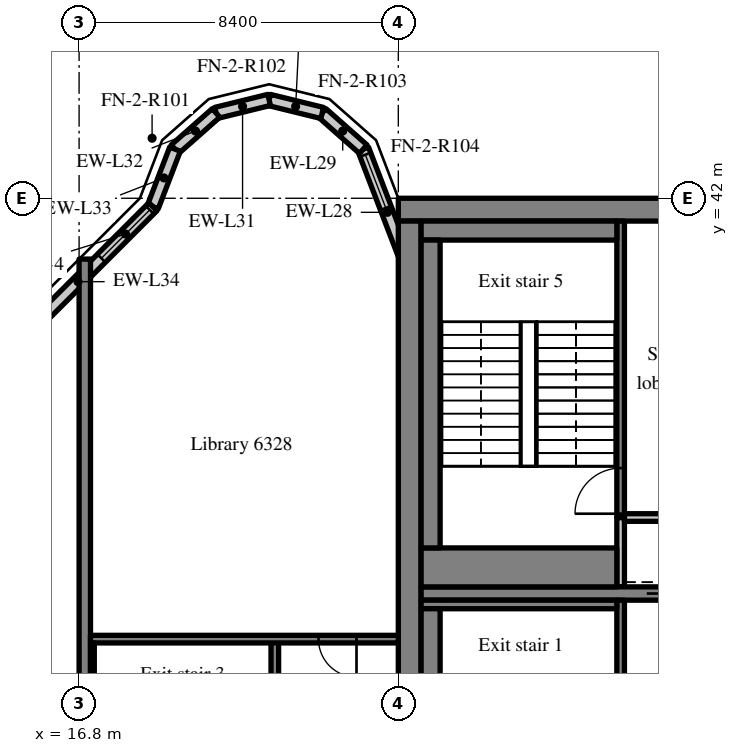
"""IFC4 building model, lengths in metres.
Left out: names, types, materials, properties, quantities, classifications, styles, units other than length and angle.
Written with IfcOpenShell. Run it as: python <this file> out.ifc"""

import sys

from ifc_helpers import new_model, si_unit, direction, frame, frame_2d, origin, place, context, subcontext, project, spatial, rectangle, extrude, source, transform, mapped, element, fill, save


model = new_model("IFC4")
c1 = context("Model", 3, precision=1e-05, world=origin(), true_north=direction((0.0, 1.0)))
c2 = subcontext(c1, "Body", "Model", "MODEL_VIEW")
j1 = project(units=[si_unit("LENGTHUNIT", "METRE"), si_unit("PLANEANGLEUNIT", "RADIAN")], contexts=[c1])
p1 = place(None, origin())
s1 = spatial("IfcSite", under=j1, at=p1, CompositionType="ELEMENT")
p2 = place(p1, origin())
s2 = spatial("IfcBuilding", under=s1, at=p2, CompositionType="ELEMENT")
p3 = place(p2, frame((0.0, 0.0, 260.8)))
s3 = spatial("IfcBuildingStorey", under=s2, at=p3, CompositionType="ELEMENT", Elevation=260.8)
m1 = source(origin(), c2, "Body", "SweptSolid", [
    extrude(rectangle(XDim=50.4, YDim=0.6, at=frame_2d((25.2, 0.0))), origin(), (0.0, 0.0, 1.0), 3.62),
])
p4 = place(p3, frame((25.2, 41.7, 0.0), z_axis=(0.0, 0.0, 1.0), x_axis=(1.0, 0.0, 0.0)))
e1 = element("IfcWall", 1, at=p4, inside=s3, PredefinedType="SHEAR", context=c2, shape_type="MappedRepresentation", body=[
    mapped(m1, transform((0.0, 0.0, 0.0), scale=1.0)),
])
m2 = source(origin(), c2, "Body", "SweptSolid", [
    extrude(rectangle(XDim=18.8, YDim=0.6, at=frame_2d((9.4, 0.0))), origin(), (0.0, 0.0, 1.0), 3.62),
])
p5 = place(p3, frame((25.5, 22.6, 0.0), z_axis=(0.0, 0.0, 1.0), x_axis=(0.0, 1.0, 0.0)))
e2 = element("IfcWall", 2, at=p5, inside=s3, PredefinedType="SHEAR", context=c2, shape_type="MappedRepresentation", body=[
    mapped(m2, transform((0.0, 0.0, 0.0), scale=1.0)),
])
m3 = source(origin(), c2, "Body", "SweptSolid", [
    extrude(rectangle(XDim=7.625, YDim=0.35, at=frame_2d((3.812, 0.0))), origin(), (0.0, 0.0, 1.0), 3.62),
])
p6 = place(p3, frame((25.8, 31.6, 0.0), z_axis=(0.0, 0.0, 1.0), x_axis=(1.0, 0.0, 0.0)))
e3 = element("IfcWall", 3, at=p6, inside=s3, PredefinedType="SHEAR", context=c2, shape_type="MappedRepresentation", body=[
    mapped(m3, transform((0.0, 0.0, 0.0), scale=1.0)),
])
m4 = source(origin(), c2, "Body", "SweptSolid", [
    extrude(rectangle(XDim=1.1, YDim=2.1, at=frame_2d((0.55, 1.05))), frame((0.0, 0.185, 0.0), z_axis=(0.0, -1.0, 0.0), x_axis=(1.0, 0.0, 0.0)), (0.0, 0.0, 1.0), 0.37),
])
p7 = place(p6, frame((5.938, 0.0, 0.0)))
e4 = element("IfcOpeningElement", 4, at=p7, cuts=e3, PredefinedType="OPENING", context=c2, shape_type="MappedRepresentation", body=[
    mapped(m4, transform((0.0, 0.0, 0.0), scale=1.0)),
])
m5 = source(origin(), c2, "Body", "SweptSolid", [
    extrude(rectangle(XDim=18.4, YDim=0.3, at=frame_2d((9.2, 0.0))), origin(), (0.0, 0.0, 1.0), 3.62),
])
p8 = place(p3, frame((16.95, 22.0, 0.0), z_axis=(0.0, 0.0, 1.0), x_axis=(0.0, 1.0, 0.0)))
e5 = element("IfcWall", 5, at=p8, inside=s3, PredefinedType="SHEAR", context=c2, shape_type="MappedRepresentation", body=[
    mapped(m5, transform((0.0, 0.0, 0.0), scale=1.0)),
])
m6 = source(origin(), c2, "Body", "SweptSolid", [
    extrude(rectangle(XDim=3.559, YDim=0.3, at=frame_2d((1.78, 0.0))), origin(), (0.0, 0.0, 1.0), 3.62),
])
p9 = place(p3, frame((25.55, 39.969, 0.0), z_axis=(0.0, 0.0, 1.0), x_axis=(-0.35779745313, 0.933799219604, 0.0)))
e6 = element("IfcWall", 6, at=p9, inside=s3, PredefinedType="SOLIDWALL", context=c2, shape_type="MappedRepresentation", body=[
    mapped(m6, transform((0.0, 0.0, 0.0), scale=1.0)),
])
m7 = source(origin(), c2, "Body", "SweptSolid", [
    extrude(rectangle(XDim=1.5, YDim=2.0, at=frame_2d((0.75, 1.0))), frame((0.0, 0.16, 0.0), z_axis=(0.0, -1.0, 0.0), x_axis=(1.0, 0.0, 0.0)), (0.0, 0.0, 1.0), 0.32),
])
p10 = place(p9, frame((1.903, 0.0, 0.9)))
e7 = element("IfcOpeningElement", 7, at=p10, cuts=e6, PredefinedType="OPENING", context=c2, shape_type="MappedRepresentation", body=[
    mapped(m7, transform((0.0, 0.0, 0.0), scale=1.0)),
])
m8 = source(origin(), c2, "Body", "SweptSolid", [
    extrude(rectangle(XDim=1.44, YDim=0.3, at=frame_2d((0.72, 0.0))), origin(), (0.0, 0.0, 1.0), 3.62),
])
p11 = place(p3, frame((24.277, 43.292, 0.0), z_axis=(0.0, 0.0, 1.0), x_axis=(-0.749649827867, 0.661834673902, 0.0)))
e8 = element("IfcWall", 8, at=p11, inside=s3, PredefinedType="SOLIDWALL", context=c2, shape_type="MappedRepresentation", body=[
    mapped(m8, transform((0.0, 0.0, 0.0), scale=1.0)),
])
m9 = source(origin(), c2, "Body", "SweptSolid", [
    extrude(rectangle(XDim=1.438, YDim=0.3, at=frame_2d((0.719, 0.0))), origin(), (0.0, 0.0, 1.0), 3.62),
])
p12 = place(p3, frame((23.197, 44.245, 0.0), z_axis=(0.0, 0.0, 1.0), x_axis=(-0.971152283879, 0.238460146601, 0.0)))
e9 = element("IfcWall", 9, at=p12, inside=s3, PredefinedType="SOLIDWALL", context=c2, shape_type="MappedRepresentation", body=[
    mapped(m9, transform((0.0, 0.0, 0.0), scale=1.0)),
])
m10 = source(origin(), c2, "Body", "SweptSolid", [
    extrude(rectangle(XDim=1.439, YDim=0.3, at=frame_2d((0.719, 0.0))), origin(), (0.0, 0.0, 1.0), 3.62),
])
p13 = place(p3, frame((21.8, 44.588, 0.0), z_axis=(0.0, 0.0, 1.0), x_axis=(-0.971161932466, -0.238420848351, 0.0)))
e10 = element("IfcWall", 10, at=p13, inside=s3, PredefinedType="SOLIDWALL", context=c2, shape_type="MappedRepresentation", body=[
    mapped(m10, transform((0.0, 0.0, 0.0), scale=1.0)),
])
m11 = source(origin(), c2, "Body", "SweptSolid", [
    extrude(rectangle(XDim=1.44, YDim=0.3, at=frame_2d((0.72, 0.0))), origin(), (0.0, 0.0, 1.0), 3.62),
])
p14 = place(p3, frame((20.403, 44.245, 0.0), z_axis=(0.0, 0.0, 1.0), x_axis=(-0.74957555648, -0.661918790432, 0.0)))
e11 = element("IfcWall", 11, at=p14, inside=s3, PredefinedType="SOLIDWALL", context=c2, shape_type="MappedRepresentation", body=[
    mapped(m11, transform((0.0, 0.0, 0.0), scale=1.0)),
])
m12 = source(origin(), c2, "Body", "SweptSolid", [
    extrude(rectangle(XDim=1.622, YDim=0.3, at=frame_2d((0.811, 0.0))), origin(), (0.0, 0.0, 1.0), 3.62),
])
p15 = place(p3, frame((19.323, 43.292, 0.0), z_axis=(0.0, 0.0, 1.0), x_axis=(-0.357778527068, -0.933806471154, 0.0)))
e12 = element("IfcWall", 12, at=p15, inside=s3, PredefinedType="SOLIDWALL", context=c2, shape_type="MappedRepresentation", body=[
    mapped(m12, transform((0.0, 0.0, 0.0), scale=1.0)),
])
m13 = source(origin(), c2, "Body", "SweptSolid", [
    extrude(rectangle(XDim=5.576, YDim=0.3, at=frame_2d((2.788, 0.0))), origin(), (0.0, 0.0, 1.0), 3.62),
])
p16 = place(p3, frame((18.743, 41.777, 0.0), z_axis=(0.0, 0.0, 1.0), x_axis=(-0.707106781187, -0.707106781187, 0.0)))
e13 = element("IfcWall", 13, at=p16, inside=s3, PredefinedType="SOLIDWALL", context=c2, shape_type="MappedRepresentation", body=[
    mapped(m13, transform((0.0, 0.0, 0.0), scale=1.0)),
])
m14 = source(origin(), c2, "Body", "SweptSolid", [
    extrude(rectangle(XDim=1.8, YDim=1.5, at=frame_2d((0.9, 0.75))), frame((0.0, 0.16, 0.0), z_axis=(0.0, -1.0, 0.0), x_axis=(1.0, 0.0, 0.0)), (0.0, 0.0, 1.0), 0.32),
])
p17 = place(p16, frame((0.118, 0.0, 0.9)))
e14 = element("IfcOpeningElement", 14, at=p17, cuts=e13, PredefinedType="OPENING", context=c2, shape_type="MappedRepresentation", body=[
    mapped(m14, transform((0.0, 0.0, 0.0), scale=1.0)),
])
m15 = source(origin(), c2, "Body", "SweptSolid", [
    extrude(rectangle(XDim=8.825, YDim=0.2, at=frame_2d((4.413, 0.0))), origin(), (0.0, 0.0, 1.0), 3.62),
])
p18 = place(p3, frame((31.05, 22.6, 0.0), z_axis=(0.0, 0.0, 1.0), x_axis=(0.0, 1.0, 0.0)))
e15 = element("IfcWall", 15, at=p18, inside=s3, PredefinedType="SOLIDWALL", context=c2, shape_type="MappedRepresentation", body=[
    mapped(m15, transform((0.0, 0.0, 0.0), scale=1.0)),
])
m16 = source(origin(), c2, "Body", "SweptSolid", [
    extrude(rectangle(XDim=1.2, YDim=2.1, at=frame_2d((0.6, 1.05))), frame((0.0, 0.11, 0.0), z_axis=(0.0, -1.0, 0.0), x_axis=(1.0, 0.0, 0.0)), (0.0, 0.0, 1.0), 0.22),
])
p19 = place(p18, frame((1.0, 0.0, 0.0)))
e16 = element("IfcOpeningElement", 16, at=p19, cuts=e15, PredefinedType="OPENING", context=c2, shape_type="MappedRepresentation", body=[
    mapped(m16, transform((0.0, 0.0, 0.0), scale=1.0)),
])
m17 = source(origin(), c2, "Body", "SweptSolid", [
    extrude(rectangle(XDim=1.825, YDim=0.2, at=frame_2d((0.913, 0.0))), origin(), (0.0, 0.0, 1.0), 3.62),
])
p20 = place(p3, frame((31.05, 31.775, 0.0), z_axis=(0.0, 0.0, 1.0), x_axis=(0.0, 1.0, 0.0)))
e17 = element("IfcWall", 17, at=p20, inside=s3, PredefinedType="SOLIDWALL", context=c2, shape_type="MappedRepresentation", body=[
    mapped(m17, transform((0.0, 0.0, 0.0), scale=1.0)),
])
m18 = source(origin(), c2, "Body", "SweptSolid", [
    extrude(rectangle(XDim=2.275, YDim=0.2, at=frame_2d((1.138, 0.0))), origin(), (0.0, 0.0, 1.0), 3.62),
])
p21 = place(p3, frame((31.15, 33.6, 0.0), z_axis=(0.0, 0.0, 1.0), x_axis=(1.0, 0.0, 0.0)))
e18 = element("IfcWall", 18, at=p21, inside=s3, PredefinedType="SOLIDWALL", context=c2, shape_type="MappedRepresentation", body=[
    mapped(m18, transform((0.0, 0.0, 0.0), scale=1.0)),
])
m19 = source(origin(), c2, "Body", "SweptSolid", [
    extrude(rectangle(XDim=7.8, YDim=0.2, at=frame_2d((3.9, 0.0))), origin(), (0.0, 0.0, 1.0), 3.62),
])
p22 = place(p3, frame((31.05, 33.6, 0.0), z_axis=(0.0, 0.0, 1.0), x_axis=(0.0, 1.0, 0.0)))
e19 = element("IfcWall", 19, at=p22, inside=s3, PredefinedType="SOLIDWALL", context=c2, shape_type="MappedRepresentation", body=[
    mapped(m19, transform((0.0, 0.0, 0.0), scale=1.0)),
])
p23 = place(p22, frame((0.1, 0.0, 0.0)))
e20 = element("IfcOpeningElement", 20, at=p23, cuts=e19, PredefinedType="OPENING", context=c2, shape_type="MappedRepresentation", body=[
    mapped(m16, transform((0.0, 0.0, 0.0), scale=1.0)),
])
m20 = source(origin(), c2, "Body", "SweptSolid", [
    extrude(rectangle(XDim=8.3, YDim=0.2, at=frame_2d((4.15, 0.0))), origin(), (0.0, 0.0, 1.0), 3.62),
])
p24 = place(p3, frame((21.95, 22.1, 0.0), z_axis=(0.0, 0.0, 1.0), x_axis=(0.0, 1.0, 0.0)))
e21 = element("IfcWall", 21, at=p24, inside=s3, PredefinedType="SOLIDWALL", context=c2, shape_type="MappedRepresentation", body=[
    mapped(m20, transform((0.0, 0.0, 0.0), scale=1.0)),
])
p25 = place(p24, frame((0.6, 0.0, 0.0)))
e22 = element("IfcOpeningElement", 22, at=p25, cuts=e21, PredefinedType="OPENING", context=c2, shape_type="MappedRepresentation", body=[
    mapped(m16, transform((0.0, 0.0, 0.0), scale=1.0)),
])
m21 = source(origin(), c2, "Body", "SweptSolid", [
    extrude(rectangle(XDim=8.1, YDim=0.2, at=frame_2d((4.05, 0.0))), origin(), (0.0, 0.0, 1.0), 3.62),
])
p26 = place(p3, frame((17.1, 30.4, 0.0), z_axis=(0.0, 0.0, 1.0), x_axis=(1.0, 0.0, 0.0)))
e23 = element("IfcWall", 23, at=p26, inside=s3, PredefinedType="SOLIDWALL", context=c2, shape_type="MappedRepresentation", body=[
    mapped(m21, transform((0.0, 0.0, 0.0), scale=1.0)),
])
m22 = source(origin(), c2, "Body", "SweptSolid", [
    extrude(rectangle(XDim=1.0, YDim=2.1, at=frame_2d((0.5, 1.05))), frame((0.0, 0.11, 0.0), z_axis=(0.0, -1.0, 0.0), x_axis=(1.0, 0.0, 0.0)), (0.0, 0.0, 1.0), 0.22),
])
p27 = place(p26, frame((6.0, 0.0, 0.0)))
e24 = element("IfcOpeningElement", 24, at=p27, cuts=e23, PredefinedType="OPENING", context=c2, shape_type="MappedRepresentation", body=[
    mapped(m22, transform((0.0, 0.0, 0.0), scale=1.0)),
])
m23 = source(origin(), c2, "Body", "SweptSolid", [
    extrude(rectangle(XDim=5.15, YDim=0.225, at=frame_2d((2.575, 0.0))), origin(), (0.0, 0.0, 1.0), 3.62),
])
p28 = place(p3, frame((25.8, 31.312, 0.0), z_axis=(0.0, 0.0, 1.0), x_axis=(1.0, 0.0, 0.0)))
e25 = element("IfcWall", 25, at=p28, inside=s3, PredefinedType="SOLIDWALL", context=c2, shape_type="MappedRepresentation", body=[
    mapped(m23, transform((0.0, 0.0, 0.0), scale=1.0)),
])
m24 = source(origin(), c2, "Body", "SweptSolid", [
    extrude(rectangle(XDim=8.1, YDim=0.5, at=frame_2d((4.05, 0.0))), origin(), (0.0, 0.0, 1.0), 3.62),
])
p29 = place(p3, frame((26.05, 23.1, 0.0), z_axis=(0.0, 0.0, 1.0), x_axis=(0.0, 1.0, 0.0)))
e26 = element("IfcWall", 26, at=p29, inside=s3, PredefinedType="SOLIDWALL", context=c2, shape_type="MappedRepresentation", body=[
    mapped(m24, transform((0.0, 0.0, 0.0), scale=1.0)),
])
m25 = source(origin(), c2, "Body", "SweptSolid", [
    extrude(rectangle(XDim=8.1, YDim=0.1, at=frame_2d((4.05, 0.0))), origin(), (0.0, 0.0, 1.0), 3.62),
])
p30 = place(p3, frame((17.15, 22.2, 0.0), z_axis=(0.0, 0.0, 1.0), x_axis=(0.0, 1.0, 0.0)))
e27 = element("IfcWall", 27, at=p30, inside=s3, PredefinedType="SOLIDWALL", context=c2, shape_type="MappedRepresentation", body=[
    mapped(m25, transform((0.0, 0.0, 0.0), scale=1.0)),
])
m26 = source(origin(), c2, "Body", "SweptSolid", [
    extrude(rectangle(XDim=5.15, YDim=0.5, at=frame_2d((2.575, 0.0))), origin(), (0.0, 0.0, 1.0), 3.62),
])
p31 = place(p3, frame((25.8, 41.15, 0.0), z_axis=(0.0, 0.0, 1.0), x_axis=(1.0, 0.0, 0.0)))
e28 = element("IfcWall", 28, at=p31, inside=s3, PredefinedType="SOLIDWALL", context=c2, shape_type="MappedRepresentation", body=[
    mapped(m26, transform((0.0, 0.0, 0.0), scale=1.0)),
])
m27 = source(origin(), c2, "Body", "SweptSolid", [
    extrude(rectangle(XDim=5.15, YDim=1.025, at=frame_2d((2.575, 0.0))), origin(), (0.0, 0.0, 1.0), 3.62),
])
p32 = place(p3, frame((25.8, 32.287, 0.0), z_axis=(0.0, 0.0, 1.0), x_axis=(1.0, 0.0, 0.0)))
e29 = element("IfcWall", 29, at=p32, inside=s3, PredefinedType="SOLIDWALL", context=c2, shape_type="MappedRepresentation", body=[
    mapped(m27, transform((0.0, 0.0, 0.0), scale=1.0)),
])
p33 = place(p3, frame((26.05, 32.8, 0.0), z_axis=(0.0, 0.0, 1.0), x_axis=(0.0, 1.0, 0.0)))
e30 = element("IfcWall", 30, at=p33, inside=s3, PredefinedType="SOLIDWALL", context=c2, shape_type="MappedRepresentation", body=[
    mapped(m24, transform((0.0, 0.0, 0.0), scale=1.0)),
])
m28 = source(origin(), c2, "Body", "SweptSolid", [
    extrude(rectangle(XDim=1.5, YDim=2.0, at=frame_2d((0.75, 1.0))), frame((0.0, 0.03, 0.0), z_axis=(0.0, -1.0, 0.0), x_axis=(1.0, 0.0, 0.0)), (0.0, 0.0, 1.0), 0.06),
])
p34 = place(p10, origin())
e31 = element("IfcWindow", 31, at=p34, inside=s3, PartitioningType="SINGLE_PANEL", PredefinedType="WINDOW", context=c2, shape_type="MappedRepresentation", body=[
    mapped(m28, transform((0.0, 0.0, 0.0), scale=1.0)),
])
fill(e7, e31)
m29 = source(origin(), c2, "Body", "SweptSolid", [
    extrude(rectangle(XDim=1.8, YDim=1.5, at=frame_2d((0.9, 0.75))), frame((0.0, 0.03, 0.0), z_axis=(0.0, -1.0, 0.0), x_axis=(1.0, 0.0, 0.0)), (0.0, 0.0, 1.0), 0.06),
])
p35 = place(p17, origin())
e32 = element("IfcWindow", 32, at=p35, inside=s3, PartitioningType="SINGLE_PANEL", PredefinedType="WINDOW", context=c2, shape_type="MappedRepresentation", body=[
    mapped(m29, transform((0.0, 0.0, 0.0), scale=1.0)),
])
fill(e14, e32)
m30 = source(origin(), c2, "Body", "SweptSolid", [
    extrude(rectangle(XDim=1.1, YDim=2.1, at=frame_2d((0.55, 1.05))), frame((0.0, 0.025, 0.0), z_axis=(0.0, -1.0, 0.0), x_axis=(1.0, 0.0, 0.0)), (0.0, 0.0, 1.0), 0.05),
])
p36 = place(p7, origin())
e33 = element("IfcDoor", 33, at=p36, inside=s3, OperationType="SLIDING_TO_LEFT", PredefinedType="DOOR", context=c2, shape_type="MappedRepresentation", body=[
    mapped(m30, transform((0.0, 0.0, 0.0), scale=1.0)),
])
fill(e4, e33)
m31 = source(origin(), c2, "Body", "SweptSolid", [
    extrude(rectangle(XDim=1.2, YDim=2.1, at=frame_2d((0.6, 1.05))), frame((0.0, 0.025, 0.0), z_axis=(0.0, -1.0, 0.0), x_axis=(1.0, 0.0, 0.0)), (0.0, 0.0, 1.0), 0.05),
])
p37 = place(p23, origin())
e34 = element("IfcDoor", 34, at=p37, inside=s3, OperationType="SINGLE_SWING_LEFT", PredefinedType="DOOR", context=c2, shape_type="MappedRepresentation", body=[
    mapped(m31, transform((0.0, 0.0, 0.0), scale=1.0)),
])
fill(e20, e34)
m32 = source(origin(), c2, "Body", "SweptSolid", [
    extrude(rectangle(XDim=1.0, YDim=2.1, at=frame_2d((0.5, 1.05))), frame((0.0, 0.025, 0.0), z_axis=(0.0, -1.0, 0.0), x_axis=(1.0, 0.0, 0.0)), (0.0, 0.0, 1.0), 0.05),
])
p38 = place(p27, origin())
e35 = element("IfcDoor", 35, at=p38, inside=s3, OperationType="SINGLE_SWING_RIGHT", PredefinedType="DOOR", context=c2, shape_type="MappedRepresentation", body=[
    mapped(m32, transform((0.0, 0.0, 0.0), scale=1.0)),
])
fill(e24, e35)
save(model, sys.argv[1])
